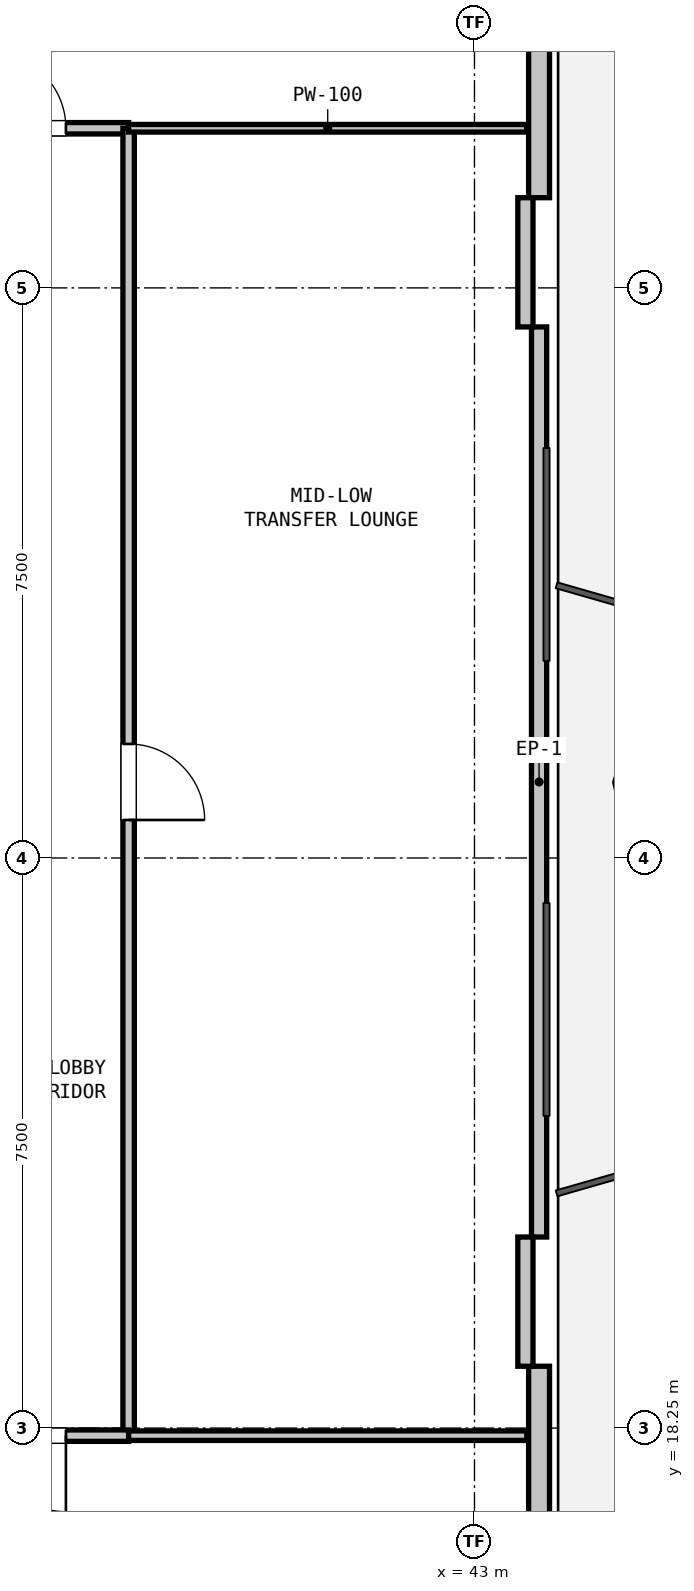
"""IFC4 building model, lengths in metres.
Left out: names, types, materials, properties, quantities, classifications, styles, units other than length and angle.
Written with IfcOpenShell. Run it as: python <this file> out.ifc"""

import sys

from ifc_helpers import new_model, si_unit, direction, frame, frame_2d, origin, place, context, subcontext, project, spatial, rectangle, extrude, element, fill, save


model = new_model("IFC4")
c1 = context("Model", 3, precision=1e-05, world=origin(), true_north=direction((0.0, 1.0)))
c2 = subcontext(c1, "Body", "Model", "MODEL_VIEW")
j1 = project(units=[si_unit("LENGTHUNIT", "METRE"), si_unit("PLANEANGLEUNIT", "RADIAN")], contexts=[c1])
p1 = place(None, origin())
s1 = spatial("IfcSite", under=j1, at=p1, CompositionType="ELEMENT")
p2 = place(p1, origin())
s2 = spatial("IfcBuilding", under=s1, at=p2, CompositionType="ELEMENT")
p3 = place(p2, frame((0.0, 0.0, 62.1)))
s3 = spatial("IfcBuildingStorey", under=s2, at=p3, CompositionType="ELEMENT", Elevation=62.1)
p4 = place(p3, frame((43.85, 47.11, 0.0), z_axis=(0.0, 0.0, 1.0), x_axis=(0.0, -1.0, 0.0)))
e1 = element("IfcWall", 1, at=p4, inside=s3, PredefinedType="SOLIDWALL", context=c2, shape_type="SweptSolid", body=[
    extrude(rectangle(XDim=12.673, YDim=0.275, at=frame_2d((6.336, 0.0))), origin(), (0.0, 0.0, 1.0), 2.865),
])
p5 = place(p4, frame((8.136, 0.0, 0.0)))
e2 = element("IfcOpeningElement", 2, at=p5, cuts=e1, PredefinedType="OPENING", context=c2, shape_type="SweptSolid", body=[
    extrude(rectangle(XDim=1.1, YDim=2.1, at=frame_2d((0.55, 1.05))), frame((0.0, 0.147, 0.0), z_axis=(0.0, -1.0, 0.0), x_axis=(1.0, 0.0, 0.0)), (0.0, 0.0, 1.0), 0.295),
])
p6 = place(p3, frame((43.85, 32.737, 0.0), z_axis=(0.0, 0.0, 1.0), x_axis=(0.0, -1.0, 0.0)))
e3 = element("IfcWall", 3, at=p6, inside=s3, PredefinedType="PARAPET", context=c2, shape_type="SweptSolid", body=[
    extrude(rectangle(XDim=11.973, YDim=0.2, at=frame_2d((5.987, 0.0))), origin(), (0.0, 0.0, 1.0), 0.2),
])
p7 = place(p3, frame((43.85, 19.063, 0.0), z_axis=(0.0, 0.0, 1.0), x_axis=(0.0, -1.0, 0.0)))
e4 = element("IfcWall", 4, at=p7, inside=s3, PredefinedType="SOLIDWALL", context=c2, shape_type="SweptSolid", body=[
    extrude(rectangle(XDim=12.673, YDim=0.275, at=frame_2d((6.336, 0.0))), origin(), (0.0, 0.0, 1.0), 2.865),
])
p8 = place(p7, frame((2.876, 0.0, 0.9)))
e5 = element("IfcOpeningElement", 5, at=p8, cuts=e4, PredefinedType="OPENING", context=c2, shape_type="SweptSolid", body=[
    extrude(rectangle(XDim=2.4, YDim=1.89, at=frame_2d((1.2, 0.945))), frame((0.0, 0.147, 0.0), z_axis=(0.0, -1.0, 0.0), x_axis=(1.0, 0.0, 0.0)), (0.0, 0.0, 1.0), 0.295),
])
for number, where, z_axis, x_axis in (
    (6, (43.67, 34.437, 0.0), (0.0, 0.0, 1.0), (0.0, -1.0, 0.0)),
    (7, (43.67, 20.763, 0.0), (0.0, 0.0, 1.0), (0.0, -1.0, 0.0)),
):
    element("IfcWall", number, at=place(p3, frame(where, z_axis=z_axis, x_axis=x_axis)), inside=s3, PredefinedType="PARAPET", context=c2, shape_type="SweptSolid", body=[
        extrude(rectangle(XDim=1.7, YDim=0.2, at=frame_2d((0.85, 0.0))), origin(), (0.0, 0.0, 1.0), 4.1),
    ])
p9 = place(p3, frame((35.8, 35.35, 0.0), z_axis=(0.0, 0.0, 1.0), x_axis=(1.0, 0.0, 0.0)))
e8 = element("IfcWall", 8, at=p9, inside=s3, PredefinedType="PARTITIONING", context=c2, shape_type="SweptSolid", body=[
    extrude(rectangle(XDim=2.65, YDim=0.15, at=frame_2d((1.325, 0.0))), origin(), (0.0, 0.0, 1.0), 2.865),
])
p10 = place(p9, frame((0.825, 0.0, 0.0)))
e9 = element("IfcOpeningElement", 9, at=p10, cuts=e8, PredefinedType="OPENING", context=c2, shape_type="SweptSolid", body=[
    extrude(rectangle(XDim=1.0, YDim=2.15, at=frame_2d((0.5, 1.075))), frame((0.0, 0.085, 0.0), z_axis=(0.0, -1.0, 0.0), x_axis=(1.0, 0.0, 0.0)), (0.0, 0.0, 1.0), 0.17),
])
p11 = place(p3, frame((38.45, 35.35, 0.0), z_axis=(0.0, 0.0, 1.0), x_axis=(0.0, -1.0, 0.0)))
e10 = element("IfcWall", 10, at=p11, inside=s3, PredefinedType="PARTITIONING", context=c2, shape_type="SweptSolid", body=[
    extrude(rectangle(XDim=17.2, YDim=0.15, at=frame_2d((8.6, 0.0))), origin(), (0.0, 0.0, 1.0), 3.115),
])
p12 = place(p11, frame((8.1, 0.0, 0.0)))
e11 = element("IfcOpeningElement", 11, at=p12, cuts=e10, PredefinedType="OPENING", context=c2, shape_type="SweptSolid", body=[
    extrude(rectangle(XDim=1.0, YDim=2.15, at=frame_2d((0.5, 1.075))), frame((0.0, 0.085, 0.0), z_axis=(0.0, -1.0, 0.0), x_axis=(1.0, 0.0, 0.0)), (0.0, 0.0, 1.0), 0.17),
])
p13 = place(p3, frame((38.45, 18.15, 0.0), z_axis=(0.0, 0.0, 1.0), x_axis=(-1.0, 0.0, 0.0)))
e12 = element("IfcWall", 12, at=p13, inside=s3, PredefinedType="PARTITIONING", context=c2, shape_type="SweptSolid", body=[
    extrude(rectangle(XDim=2.65, YDim=0.15, at=frame_2d((1.325, 0.0))), origin(), (0.0, 0.0, 1.0), 3.115),
])
p14 = place(p13, frame((0.825, 0.0, 0.0)))
e13 = element("IfcOpeningElement", 13, at=p14, cuts=e12, PredefinedType="OPENING", context=c2, shape_type="SweptSolid", body=[
    extrude(rectangle(XDim=1.0, YDim=2.15, at=frame_2d((0.5, 1.075))), frame((0.0, 0.085, 0.0), z_axis=(0.0, -1.0, 0.0), x_axis=(1.0, 0.0, 0.0)), (0.0, 0.0, 1.0), 0.17),
])
p15 = place(p3, frame((43.688, 35.35, 0.0), z_axis=(0.0, 0.0, 1.0), x_axis=(-1.0, 0.0, 0.0)))
e14 = element("IfcWall", 14, at=p15, inside=s3, PredefinedType="PARTITIONING", context=c2, shape_type="SweptSolid", body=[
    extrude(rectangle(XDim=5.239, YDim=0.1, at=frame_2d((2.619, 0.0))), origin(), (0.0, 0.0, 1.0), 2.365),
])
p16 = place(p3, frame((43.688, 18.15, 0.0), z_axis=(0.0, 0.0, 1.0), x_axis=(-1.0, 0.0, 0.0)))
e15 = element("IfcWall", 15, at=p16, inside=s3, PredefinedType="PARTITIONING", context=c2, shape_type="SweptSolid", body=[
    extrude(rectangle(XDim=5.239, YDim=0.125, at=frame_2d((2.619, 0.0))), origin(), (0.0, 0.0, 1.0), 2.365),
])
p17 = place(p10, origin())
e16 = element("IfcDoor", 16, at=p17, inside=s3, OperationType="SINGLE_SWING_LEFT", PredefinedType="DOOR", context=c2, shape_type="SweptSolid", body=[
    extrude(rectangle(XDim=1.0, YDim=2.15, at=frame_2d((0.5, 1.075))), frame((0.0, 0.025, 0.0), z_axis=(0.0, -1.0, 0.0), x_axis=(1.0, 0.0, 0.0)), (0.0, 0.0, 1.0), 0.05),
])
fill(e9, e16)
p18 = place(p12, origin())
e17 = element("IfcDoor", 17, at=p18, inside=s3, OperationType="SINGLE_SWING_RIGHT", PredefinedType="DOOR", context=c2, shape_type="SweptSolid", body=[
    extrude(rectangle(XDim=1.0, YDim=2.15, at=frame_2d((0.5, 1.075))), frame((0.0, 0.025, 0.0), z_axis=(0.0, -1.0, 0.0), x_axis=(1.0, 0.0, 0.0)), (0.0, 0.0, 1.0), 0.05),
])
fill(e11, e17)
p19 = place(p14, origin())
e18 = element("IfcDoor", 18, at=p19, inside=s3, OperationType="SINGLE_SWING_LEFT", PredefinedType="DOOR", context=c2, shape_type="SweptSolid", body=[
    extrude(rectangle(XDim=1.0, YDim=2.15, at=frame_2d((0.5, 1.075))), frame((0.0, 0.025, 0.0), z_axis=(0.0, -1.0, 0.0), x_axis=(1.0, 0.0, 0.0)), (0.0, 0.0, 1.0), 0.05),
])
fill(e13, e18)
save(model, sys.argv[1])
